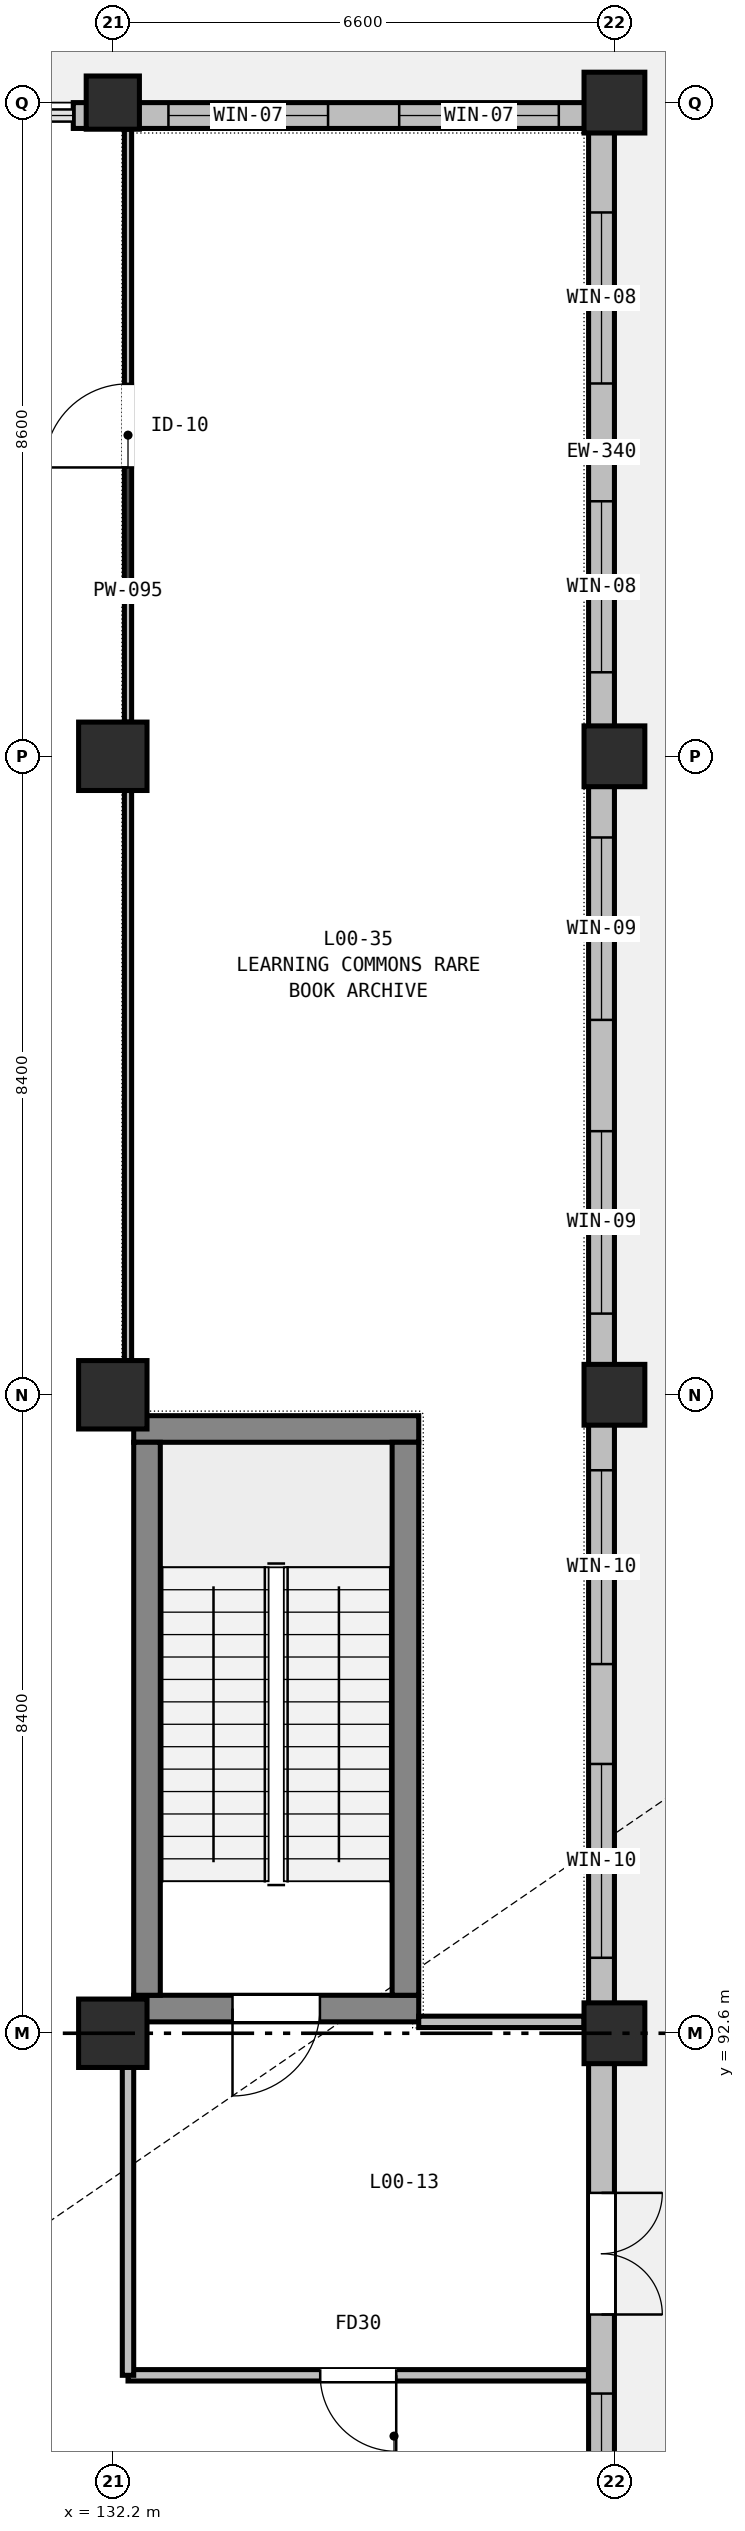
"""IFC4 building model, lengths in metres.
Left out: names, types, materials, properties, quantities, classifications, styles, units other than length and angle.
Written with IfcOpenShell. Run it as: python <this file> out.ifc"""

import sys

from ifc_helpers import new_model, si_unit, direction, frame, frame_2d, origin, origin_2d, place, context, subcontext, project, spatial, rectangle, extrude, element, fill, save


model = new_model("IFC4")
c1 = context("Model", 3, precision=1e-05, world=origin(), true_north=direction((0.0, 1.0)))
c2 = subcontext(c1, "Body", "Model", "MODEL_VIEW")
j1 = project(units=[si_unit("LENGTHUNIT", "METRE"), si_unit("PLANEANGLEUNIT", "RADIAN")], contexts=[c1])
p1 = place(None, origin())
s1 = spatial("IfcSite", under=j1, at=p1, CompositionType="ELEMENT")
p2 = place(p1, origin())
s2 = spatial("IfcBuilding", under=s1, at=p2, CompositionType="ELEMENT")
p3 = place(p2, origin())
s3 = spatial("IfcBuildingStorey", under=s2, at=p3, CompositionType="ELEMENT", Elevation=0.0)
for number, where, z_axis, x_axis in (
    (1, (132.2, 92.6, -0.32), (0.0, 0.0, 1.0), (1.0, 0.0, 0.0)),
    (2, (132.2, 101.0, -0.32), (0.0, 0.0, 1.0), (1.0, 0.0, 0.0)),
    (3, (132.2, 109.4, -0.32), (0.0, 0.0, 1.0), (1.0, 0.0, 0.0)),
):
    element("IfcColumn", number, at=place(p3, frame(where, z_axis=z_axis, x_axis=x_axis)), inside=s3, PredefinedType="COLUMN", context=c2, shape_type="SweptSolid", body=[
        extrude(rectangle(XDim=0.9, YDim=0.9, at=origin_2d()), origin(), (0.0, 0.0, 1.0), 5.72),
    ])
p4 = place(p3, frame((132.2, 118.0, -0.32), z_axis=(0.0, 0.0, 1.0), x_axis=(1.0, 0.0, 0.0)))
e4 = element("IfcColumn", 4, at=p4, inside=s3, PredefinedType="COLUMN", context=c2, shape_type="SweptSolid", body=[
    extrude(rectangle(XDim=0.7, YDim=0.7, at=origin_2d()), origin(), (0.0, 0.0, 1.0), 5.66),
])
for number, where, z_axis, x_axis in (
    (5, (138.8, 92.6, -0.32), (0.0, 0.0, 1.0), (1.0, 0.0, 0.0)),
    (6, (138.8, 101.0, -0.32), (0.0, 0.0, 1.0), (1.0, 0.0, 0.0)),
    (7, (138.8, 109.4, -0.32), (0.0, 0.0, 1.0), (1.0, 0.0, 0.0)),
):
    element("IfcColumn", number, at=place(p3, frame(where, z_axis=z_axis, x_axis=x_axis)), inside=s3, PredefinedType="COLUMN", context=c2, shape_type="SweptSolid", body=[
        extrude(rectangle(XDim=0.8, YDim=0.8, at=origin_2d()), origin(), (0.0, 0.0, 1.0), 5.72),
    ])
p5 = place(p3, frame((138.8, 118.0, -0.32), z_axis=(0.0, 0.0, 1.0), x_axis=(1.0, 0.0, 0.0)))
e8 = element("IfcColumn", 8, at=p5, inside=s3, PredefinedType="COLUMN", context=c2, shape_type="SweptSolid", body=[
    extrude(rectangle(XDim=0.8, YDim=0.8, at=origin_2d()), origin(), (0.0, 0.0, 1.0), 5.66),
])
p6 = place(p3, frame((136.225, 92.925, -0.32), z_axis=(0.0, 0.0, 1.0), x_axis=(-1.0, 0.0, 0.0)))
e9 = element("IfcWall", 9, at=p6, inside=s3, PredefinedType="SHEAR", context=c2, shape_type="SweptSolid", body=[
    extrude(rectangle(XDim=3.75, YDim=0.35, at=frame_2d((1.875, 0.0))), origin(), (0.0, 0.0, 1.0), 5.72),
])
p7 = place(p6, frame((1.3, 0.0, 0.32)))
e10 = element("IfcOpeningElement", 10, at=p7, cuts=e9, PredefinedType="OPENING", context=c2, shape_type="SweptSolid", body=[
    extrude(rectangle(XDim=1.15, YDim=2.15, at=frame_2d((0.575, 1.075))), frame((0.0, 0.185, 0.0), z_axis=(0.0, -1.0, 0.0), x_axis=(1.0, 0.0, 0.0)), (0.0, 0.0, 1.0), 0.37),
])
p8 = place(p3, frame((132.475, 100.55, -0.32), z_axis=(0.0, 0.0, 1.0), x_axis=(1.0, 0.0, 0.0)))
e11 = element("IfcWall", 11, at=p8, inside=s3, PredefinedType="SHEAR", context=c2, shape_type="SweptSolid", body=[
    extrude(rectangle(XDim=3.75, YDim=0.35, at=frame_2d((1.875, 0.0))), origin(), (0.0, 0.0, 1.0), 5.72),
])
for number, where, z_axis, x_axis in (
    (12, (132.65, 93.1, -0.32), (0.0, 0.0, 1.0), (0.0, 1.0, 0.0)),
    (13, (136.05, 93.1, -0.32), (0.0, 0.0, 1.0), (0.0, 1.0, 0.0)),
):
    element("IfcWall", number, at=place(p3, frame(where, z_axis=z_axis, x_axis=x_axis)), inside=s3, PredefinedType="SHEAR", context=c2, shape_type="SweptSolid", body=[
        extrude(rectangle(XDim=7.275, YDim=0.35, at=frame_2d((3.637, 0.0))), origin(), (0.0, 0.0, 1.0), 5.72),
    ])
p9 = place(p3, frame((131.68, 117.83, 0.0), z_axis=(0.0, 0.0, 1.0), x_axis=(1.0, 0.0, 0.0)))
e14 = element("IfcWall", 14, at=p9, inside=s3, PredefinedType="STANDARD", context=c2, shape_type="SweptSolid", body=[
    extrude(rectangle(XDim=0.52, YDim=0.34, at=frame_2d((0.26, 0.0))), origin(), (0.0, 0.0, 1.0), 4.535),
])
p10 = place(p3, frame((132.2, 117.83, 0.0), z_axis=(0.0, 0.0, 1.0), x_axis=(1.0, 0.0, 0.0)))
e15 = element("IfcWall", 15, at=p10, inside=s3, PredefinedType="STANDARD", context=c2, shape_type="SweptSolid", body=[
    extrude(rectangle(XDim=6.6, YDim=0.34, at=frame_2d((3.3, 0.0))), origin(), (0.0, 0.0, 1.0), 4.535),
])
p11 = place(p10, frame((0.732, 0.0, 0.9)))
e16 = element("IfcOpeningElement", 16, at=p11, cuts=e15, PredefinedType="OPENING", context=c2, shape_type="SweptSolid", body=[
    extrude(rectangle(XDim=2.1, YDim=2.1, at=frame_2d((1.05, 1.05))), frame((0.0, 0.18, 0.0), z_axis=(0.0, -1.0, 0.0), x_axis=(1.0, 0.0, 0.0)), (0.0, 0.0, 1.0), 0.36),
])
p12 = place(p10, frame((3.768, 0.0, 0.9)))
e17 = element("IfcOpeningElement", 17, at=p12, cuts=e15, PredefinedType="OPENING", context=c2, shape_type="SweptSolid", body=[
    extrude(rectangle(XDim=2.1, YDim=2.1, at=frame_2d((1.05, 1.05))), frame((0.0, 0.18, 0.0), z_axis=(0.0, -1.0, 0.0), x_axis=(1.0, 0.0, 0.0)), (0.0, 0.0, 1.0), 0.36),
])
p13 = place(p3, frame((138.63, 117.66, 0.0), z_axis=(0.0, 0.0, 1.0), x_axis=(0.0, -1.0, 0.0)))
e18 = element("IfcWall", 18, at=p13, inside=s3, PredefinedType="STANDARD", context=c2, shape_type="SweptSolid", body=[
    extrude(rectangle(XDim=8.26, YDim=0.34, at=frame_2d((4.13, 0.0))), origin(), (0.0, 0.0, 1.0), 4.685),
])
p14 = place(p13, frame((1.105, 0.0, 0.9)))
e19 = element("IfcOpeningElement", 19, at=p14, cuts=e18, PredefinedType="OPENING", context=c2, shape_type="SweptSolid", body=[
    extrude(rectangle(XDim=2.25, YDim=2.1, at=frame_2d((1.125, 1.05))), frame((0.0, 0.18, 0.0), z_axis=(0.0, -1.0, 0.0), x_axis=(1.0, 0.0, 0.0)), (0.0, 0.0, 1.0), 0.36),
])
p15 = place(p13, frame((4.905, 0.0, 0.9)))
e20 = element("IfcOpeningElement", 20, at=p15, cuts=e18, PredefinedType="OPENING", context=c2, shape_type="SweptSolid", body=[
    extrude(rectangle(XDim=2.25, YDim=2.1, at=frame_2d((1.125, 1.05))), frame((0.0, 0.18, 0.0), z_axis=(0.0, -1.0, 0.0), x_axis=(1.0, 0.0, 0.0)), (0.0, 0.0, 1.0), 0.36),
])
p16 = place(p3, frame((138.63, 109.4, 0.0), z_axis=(0.0, 0.0, 1.0), x_axis=(0.0, -1.0, 0.0)))
e21 = element("IfcWall", 21, at=p16, inside=s3, PredefinedType="STANDARD", context=c2, shape_type="SweptSolid", body=[
    extrude(rectangle(XDim=8.4, YDim=0.34, at=frame_2d((4.2, 0.0))), origin(), (0.0, 0.0, 1.0), 4.685),
])
p17 = place(p16, frame((1.068, 0.0, 0.9)))
e22 = element("IfcOpeningElement", 22, at=p17, cuts=e21, PredefinedType="OPENING", context=c2, shape_type="SweptSolid", body=[
    extrude(rectangle(XDim=2.4, YDim=2.1, at=frame_2d((1.2, 1.05))), frame((0.0, 0.18, 0.0), z_axis=(0.0, -1.0, 0.0), x_axis=(1.0, 0.0, 0.0)), (0.0, 0.0, 1.0), 0.36),
])
p18 = place(p16, frame((4.932, 0.0, 0.9)))
e23 = element("IfcOpeningElement", 23, at=p18, cuts=e21, PredefinedType="OPENING", context=c2, shape_type="SweptSolid", body=[
    extrude(rectangle(XDim=2.4, YDim=2.1, at=frame_2d((1.2, 1.05))), frame((0.0, 0.18, 0.0), z_axis=(0.0, -1.0, 0.0), x_axis=(1.0, 0.0, 0.0)), (0.0, 0.0, 1.0), 0.36),
])
p19 = place(p3, frame((138.63, 101.0, 0.0), z_axis=(0.0, 0.0, 1.0), x_axis=(0.0, -1.0, 0.0)))
e24 = element("IfcWall", 24, at=p19, inside=s3, PredefinedType="STANDARD", context=c2, shape_type="SweptSolid", body=[
    extrude(rectangle(XDim=8.4, YDim=0.34, at=frame_2d((4.2, 0.0))), origin(), (0.0, 0.0, 1.0), 4.685),
])
p20 = place(p19, frame((0.993, 0.0, 0.75)))
e25 = element("IfcOpeningElement", 25, at=p20, cuts=e24, PredefinedType="OPENING", context=c2, shape_type="SweptSolid", body=[
    extrude(rectangle(XDim=2.55, YDim=2.15, at=frame_2d((1.275, 1.075))), frame((0.0, 0.18, 0.0), z_axis=(0.0, -1.0, 0.0), x_axis=(1.0, 0.0, 0.0)), (0.0, 0.0, 1.0), 0.36),
])
p21 = place(p19, frame((4.857, 0.0, 0.75)))
e26 = element("IfcOpeningElement", 26, at=p21, cuts=e24, PredefinedType="OPENING", context=c2, shape_type="SweptSolid", body=[
    extrude(rectangle(XDim=2.55, YDim=2.15, at=frame_2d((1.275, 1.075))), frame((0.0, 0.18, 0.0), z_axis=(0.0, -1.0, 0.0), x_axis=(1.0, 0.0, 0.0)), (0.0, 0.0, 1.0), 0.36),
])
p22 = place(p3, frame((138.63, 92.6, 0.0), z_axis=(0.0, 0.0, 1.0), x_axis=(0.0, -1.0, 0.0)))
e27 = element("IfcWall", 27, at=p22, inside=s3, PredefinedType="STANDARD", context=c2, shape_type="SweptSolid", body=[
    extrude(rectangle(XDim=8.06, YDim=0.34, at=frame_2d((4.03, 0.0))), origin(), (0.0, 0.0, 1.0), 4.685),
])
p23 = place(p22, frame((2.1, 0.0, 0.0)))
e28 = element("IfcOpeningElement", 28, at=p23, cuts=e27, PredefinedType="OPENING", context=c2, shape_type="SweptSolid", body=[
    extrude(rectangle(XDim=1.6, YDim=2.2, at=frame_2d((0.8, 1.1))), frame((0.0, 0.18, 0.0), z_axis=(0.0, -1.0, 0.0), x_axis=(1.0, 0.0, 0.0)), (0.0, 0.0, 1.0), 0.36),
])
p24 = place(p22, frame((4.74, 0.0, 0.75)))
e29 = element("IfcOpeningElement", 29, at=p24, cuts=e27, PredefinedType="OPENING", context=c2, shape_type="SweptSolid", body=[
    extrude(rectangle(XDim=2.7, YDim=2.2, at=frame_2d((1.35, 1.1))), frame((0.0, 0.18, 0.0), z_axis=(0.0, -1.0, 0.0), x_axis=(1.0, 0.0, 0.0)), (0.0, 0.0, 1.0), 0.36),
])
p25 = place(p3, frame((136.225, 92.75, 0.0), z_axis=(0.0, 0.0, 1.0), x_axis=(1.0, 0.0, 0.0)))
e30 = element("IfcWall", 30, at=p25, inside=s3, PredefinedType="PARTITIONING", context=c2, shape_type="SweptSolid", body=[
    extrude(rectangle(XDim=2.175, YDim=0.15, at=frame_2d((1.087, 0.0))), origin(), (0.0, 0.0, 1.0), 4.735),
])
p26 = place(p3, frame((138.458, 88.1, 0.0), z_axis=(0.0, 0.0, 1.0), x_axis=(-1.0, 0.0, 0.0)))
e31 = element("IfcWall", 31, at=p26, inside=s3, PredefinedType="PARTITIONING", context=c2, shape_type="SweptSolid", body=[
    extrude(rectangle(XDim=6.058, YDim=0.15, at=frame_2d((3.029, 0.0))), origin(), (0.0, 0.0, 1.0), 4.535),
])
p27 = place(p26, frame((2.529, 0.0, 0.0)))
e32 = element("IfcOpeningElement", 32, at=p27, cuts=e31, PredefinedType="OPENING", context=c2, shape_type="SweptSolid", body=[
    extrude(rectangle(XDim=1.0, YDim=2.1, at=frame_2d((0.5, 1.05))), frame((0.0, 0.085, 0.0), z_axis=(0.0, -1.0, 0.0), x_axis=(1.0, 0.0, 0.0)), (0.0, 0.0, 1.0), 0.17),
])
p28 = place(p3, frame((132.4, 88.1, 0.0), z_axis=(0.0, 0.0, 1.0), x_axis=(0.0, 1.0, 0.0)))
e33 = element("IfcWall", 33, at=p28, inside=s3, PredefinedType="PARTITIONING", context=c2, shape_type="SweptSolid", body=[
    extrude(rectangle(XDim=4.05, YDim=0.15, at=frame_2d((2.025, 0.0))), origin(), (0.0, 0.0, 1.0), 4.535),
])
p29 = place(p3, frame((132.4, 101.45, 0.0), z_axis=(0.0, 0.0, 1.0), x_axis=(0.0, 1.0, 0.0)))
e34 = element("IfcWall", 34, at=p29, inside=s3, PredefinedType="PARTITIONING", context=c2, shape_type="SweptSolid", body=[
    extrude(rectangle(XDim=7.5, YDim=0.095, at=frame_2d((3.75, 0.0))), origin(), (0.0, 0.0, 1.0), 4.535),
])
p30 = place(p3, frame((132.4, 109.85, 0.0), z_axis=(0.0, 0.0, 1.0), x_axis=(0.0, 1.0, 0.0)))
e35 = element("IfcWall", 35, at=p30, inside=s3, PredefinedType="PARTITIONING", context=c2, shape_type="SweptSolid", body=[
    extrude(rectangle(XDim=7.8, YDim=0.095, at=frame_2d((3.9, 0.0))), origin(), (0.0, 0.0, 1.0), 4.535),
])
p31 = place(p30, frame((3.35, 0.0, 0.0)))
e36 = element("IfcOpeningElement", 36, at=p31, cuts=e35, PredefinedType="OPENING", context=c2, shape_type="SweptSolid", body=[
    extrude(rectangle(XDim=1.1, YDim=2.06, at=frame_2d((0.55, 1.03))), frame((0.0, 0.057, 0.0), z_axis=(0.0, -1.0, 0.0), x_axis=(1.0, 0.0, 0.0)), (0.0, 0.0, 1.0), 0.115),
])
p32 = place(p23, origin())
e37 = element("IfcDoor", 37, at=p32, inside=s3, OperationType="DOUBLE_DOOR_SINGLE_SWING", PredefinedType="DOOR", context=c2, shape_type="SweptSolid", body=[
    extrude(rectangle(XDim=1.6, YDim=2.2, at=frame_2d((0.8, 1.1))), frame((0.0, 0.025, 0.0), z_axis=(0.0, -1.0, 0.0), x_axis=(1.0, 0.0, 0.0)), (0.0, 0.0, 1.0), 0.05),
])
fill(e28, e37)
p33 = place(p11, origin())
e38 = element("IfcWindow", 38, at=p33, inside=s3, PartitioningType="SINGLE_PANEL", PredefinedType="WINDOW", context=c2, shape_type="SweptSolid", body=[
    extrude(rectangle(XDim=2.1, YDim=2.1, at=frame_2d((1.05, 1.05))), frame((0.0, 0.03, 0.0), z_axis=(0.0, -1.0, 0.0), x_axis=(1.0, 0.0, 0.0)), (0.0, 0.0, 1.0), 0.06),
])
fill(e16, e38)
p34 = place(p12, origin())
e39 = element("IfcWindow", 39, at=p34, inside=s3, PartitioningType="SINGLE_PANEL", PredefinedType="WINDOW", context=c2, shape_type="SweptSolid", body=[
    extrude(rectangle(XDim=2.1, YDim=2.1, at=frame_2d((1.05, 1.05))), frame((0.0, 0.03, 0.0), z_axis=(0.0, -1.0, 0.0), x_axis=(1.0, 0.0, 0.0)), (0.0, 0.0, 1.0), 0.06),
])
fill(e17, e39)
p35 = place(p14, origin())
e40 = element("IfcWindow", 40, at=p35, inside=s3, PartitioningType="SINGLE_PANEL", PredefinedType="WINDOW", context=c2, shape_type="SweptSolid", body=[
    extrude(rectangle(XDim=2.25, YDim=2.1, at=frame_2d((1.125, 1.05))), frame((0.0, 0.03, 0.0), z_axis=(0.0, -1.0, 0.0), x_axis=(1.0, 0.0, 0.0)), (0.0, 0.0, 1.0), 0.06),
])
fill(e19, e40)
p36 = place(p15, origin())
e41 = element("IfcWindow", 41, at=p36, inside=s3, PartitioningType="SINGLE_PANEL", PredefinedType="WINDOW", context=c2, shape_type="SweptSolid", body=[
    extrude(rectangle(XDim=2.25, YDim=2.1, at=frame_2d((1.125, 1.05))), frame((0.0, 0.03, 0.0), z_axis=(0.0, -1.0, 0.0), x_axis=(1.0, 0.0, 0.0)), (0.0, 0.0, 1.0), 0.06),
])
fill(e20, e41)
p37 = place(p17, origin())
e42 = element("IfcWindow", 42, at=p37, inside=s3, PartitioningType="SINGLE_PANEL", PredefinedType="WINDOW", context=c2, shape_type="SweptSolid", body=[
    extrude(rectangle(XDim=2.4, YDim=2.1, at=frame_2d((1.2, 1.05))), frame((0.0, 0.03, 0.0), z_axis=(0.0, -1.0, 0.0), x_axis=(1.0, 0.0, 0.0)), (0.0, 0.0, 1.0), 0.06),
])
fill(e22, e42)
p38 = place(p18, origin())
e43 = element("IfcWindow", 43, at=p38, inside=s3, PartitioningType="SINGLE_PANEL", PredefinedType="WINDOW", context=c2, shape_type="SweptSolid", body=[
    extrude(rectangle(XDim=2.4, YDim=2.1, at=frame_2d((1.2, 1.05))), frame((0.0, 0.03, 0.0), z_axis=(0.0, -1.0, 0.0), x_axis=(1.0, 0.0, 0.0)), (0.0, 0.0, 1.0), 0.06),
])
fill(e23, e43)
p39 = place(p20, origin())
e44 = element("IfcWindow", 44, at=p39, inside=s3, PartitioningType="SINGLE_PANEL", PredefinedType="WINDOW", context=c2, shape_type="SweptSolid", body=[
    extrude(rectangle(XDim=2.55, YDim=2.15, at=frame_2d((1.275, 1.075))), frame((0.0, 0.03, 0.0), z_axis=(0.0, -1.0, 0.0), x_axis=(1.0, 0.0, 0.0)), (0.0, 0.0, 1.0), 0.06),
])
fill(e25, e44)
p40 = place(p21, origin())
e45 = element("IfcWindow", 45, at=p40, inside=s3, PartitioningType="SINGLE_PANEL", PredefinedType="WINDOW", context=c2, shape_type="SweptSolid", body=[
    extrude(rectangle(XDim=2.55, YDim=2.15, at=frame_2d((1.275, 1.075))), frame((0.0, 0.03, 0.0), z_axis=(0.0, -1.0, 0.0), x_axis=(1.0, 0.0, 0.0)), (0.0, 0.0, 1.0), 0.06),
])
fill(e26, e45)
p41 = place(p24, origin())
e46 = element("IfcWindow", 46, at=p41, inside=s3, PartitioningType="SINGLE_PANEL", PredefinedType="WINDOW", context=c2, shape_type="SweptSolid", body=[
    extrude(rectangle(XDim=2.7, YDim=2.2, at=frame_2d((1.35, 1.1))), frame((0.0, 0.03, 0.0), z_axis=(0.0, -1.0, 0.0), x_axis=(1.0, 0.0, 0.0)), (0.0, 0.0, 1.0), 0.06),
])
fill(e29, e46)
p42 = place(p7, origin())
e47 = element("IfcDoor", 47, at=p42, inside=s3, OperationType="SINGLE_SWING_RIGHT", PredefinedType="DOOR", context=c2, shape_type="SweptSolid", body=[
    extrude(rectangle(XDim=1.15, YDim=2.15, at=frame_2d((0.575, 1.075))), frame((0.0, 0.025, 0.0), z_axis=(0.0, -1.0, 0.0), x_axis=(1.0, 0.0, 0.0)), (0.0, 0.0, 1.0), 0.05),
])
fill(e10, e47)
p43 = place(p27, origin())
e48 = element("IfcDoor", 48, at=p43, inside=s3, OperationType="SINGLE_SWING_LEFT", PredefinedType="DOOR", context=c2, shape_type="SweptSolid", body=[
    extrude(rectangle(XDim=1.0, YDim=2.1, at=frame_2d((0.5, 1.05))), frame((0.0, 0.025, 0.0), z_axis=(0.0, -1.0, 0.0), x_axis=(1.0, 0.0, 0.0)), (0.0, 0.0, 1.0), 0.05),
])
fill(e32, e48)
p44 = place(p31, origin())
e49 = element("IfcDoor", 49, at=p44, inside=s3, OperationType="SINGLE_SWING_LEFT", PredefinedType="DOOR", context=c2, shape_type="SweptSolid", body=[
    extrude(rectangle(XDim=1.1, YDim=2.06, at=frame_2d((0.55, 1.03))), frame((0.0, 0.025, 0.0), z_axis=(0.0, -1.0, 0.0), x_axis=(1.0, 0.0, 0.0)), (0.0, 0.0, 1.0), 0.05),
])
fill(e36, e49)
save(model, sys.argv[1])
